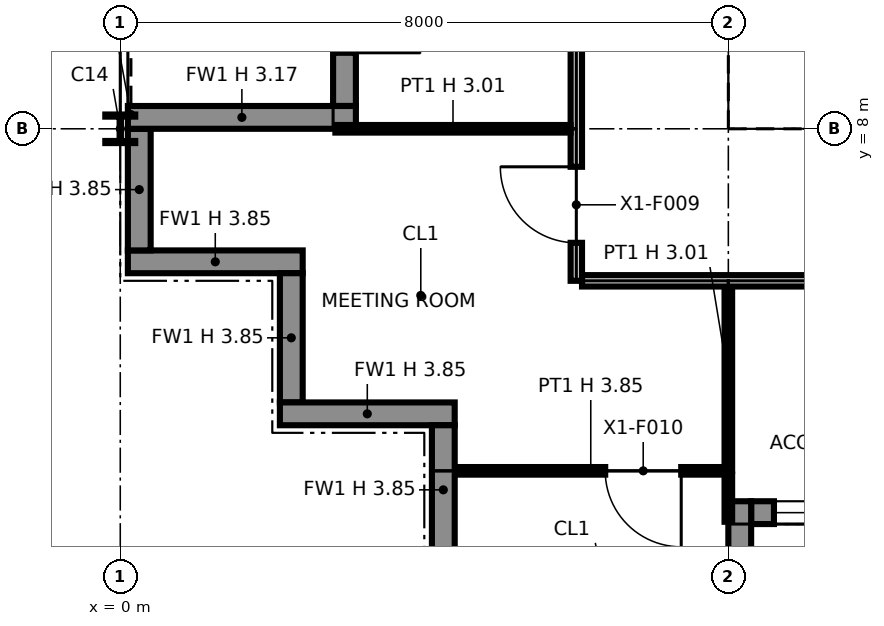
"""IFC4 building model, lengths in metres.
Left out: names, types, materials, properties, quantities, classifications, styles, units other than length and angle.
Written with IfcOpenShell. Run it as: python <this file> out.ifc"""

import sys

from ifc_helpers import new_model, si_unit, direction, frame, frame_2d, origin, origin_2d, place, context, subcontext, project, spatial, polyline, rectangle, i_section, outline, extrude, element, fill, save


model = new_model("IFC4")
c1 = context("Model", 3, precision=1e-05, world=origin(), true_north=direction((0.0, 1.0)))
c2 = subcontext(c1, "Body", "Model", "MODEL_VIEW")
j1 = project(units=[si_unit("LENGTHUNIT", "METRE"), si_unit("PLANEANGLEUNIT", "RADIAN")], contexts=[c1])
p1 = place(None, origin())
s1 = spatial("IfcSite", under=j1, at=p1, CompositionType="ELEMENT")
p2 = place(p1, origin())
s2 = spatial("IfcBuilding", under=s1, at=p2, CompositionType="ELEMENT")
p3 = place(p2, frame((0.0, 0.0, 247.0)))
s3 = spatial("IfcBuildingStorey", under=s2, at=p3, CompositionType="ELEMENT", Elevation=247.0)
p4 = place(p3, frame((0.0, 8.0, 0.0), z_axis=(0.0, 0.0, 1.0), x_axis=(1.0, 0.0, 0.0)))
e1 = element("IfcColumn", 1, at=p4, inside=s3, PredefinedType="COLUMN", context=c2, shape_type="SweptSolid", body=[
    extrude(i_section(OverallWidth=0.394, OverallDepth=0.376, WebThickness=0.017, FlangeThickness=0.028, at=origin_2d()), origin(), (0.0, 0.0, 1.0), 3.85),
])
p5 = place(p3, frame((8.0, 8.0, 0.0), z_axis=(0.0, 0.0, 1.0), x_axis=(1.0, 0.0, 0.0)))
e2 = element("IfcColumn", 2, at=p5, inside=s3, PredefinedType="COLUMN", context=c2, shape_type="SweptSolid", body=[
    extrude(i_section(OverallWidth=0.371, OverallDepth=0.361, WebThickness=0.012, FlangeThickness=0.02, at=origin_2d()), origin(), (0.0, 0.0, 1.0), 3.85),
])
p6 = place(p3, frame((0.1, 6.25, 0.0), z_axis=(0.0, 0.0, 1.0), x_axis=(1.0, 0.0, 0.0)))
e3 = element("IfcWall", 3, at=p6, inside=s3, PredefinedType="SOLIDWALL", context=c2, shape_type="SweptSolid", body=[
    extrude(rectangle(XDim=2.3, YDim=0.3, at=frame_2d((1.15, 0.0))), origin(), (0.0, 0.0, 1.0), 3.85),
])
p7 = place(p3, frame((2.25, 6.1, 0.0), z_axis=(0.0, 0.0, 1.0), x_axis=(0.0, -1.0, 0.0)))
e4 = element("IfcWall", 4, at=p7, inside=s3, PredefinedType="SOLIDWALL", context=c2, shape_type="SweptSolid", body=[
    extrude(rectangle(XDim=1.7, YDim=0.3, at=frame_2d((0.85, 0.0))), origin(), (0.0, 0.0, 1.0), 3.85),
])
p8 = place(p3, frame((2.1, 4.25, 0.0), z_axis=(0.0, 0.0, 1.0), x_axis=(1.0, 0.0, 0.0)))
e5 = element("IfcWall", 5, at=p8, inside=s3, PredefinedType="SOLIDWALL", context=c2, shape_type="SweptSolid", body=[
    extrude(rectangle(XDim=2.3, YDim=0.3, at=frame_2d((1.15, 0.0))), origin(), (0.0, 0.0, 1.0), 3.85),
])
p9 = place(p3, frame((4.25, 4.1, 0.0), z_axis=(0.0, 0.0, 1.0), x_axis=(0.0, -1.0, 0.0)))
e6 = element("IfcWall", 6, at=p9, inside=s3, PredefinedType="SOLIDWALL", context=c2, shape_type="SweptSolid", body=[
    extrude(rectangle(XDim=1.7, YDim=0.3, at=frame_2d((0.85, 0.0))), origin(), (0.0, 0.0, 1.0), 3.85),
])
p10 = place(p3, frame((8.3, 2.95, 0.0), z_axis=(0.0, 0.0, 1.0), x_axis=(1.0, 0.0, 0.0)))
e7 = element("IfcWall", 7, at=p10, inside=s3, PredefinedType="SOLIDWALL", context=c2, shape_type="SweptSolid", body=[
    extrude(rectangle(XDim=7.4, YDim=0.3, at=frame_2d((3.7, 0.0))), origin(), (0.0, 0.0, 1.0), 3.85),
])
p11 = place(p10, frame((0.3, 0.0, 0.9)))
e8 = element("IfcOpeningElement", 8, at=p11, cuts=e7, PredefinedType="OPENING", context=c2, shape_type="SweptSolid", body=[
    extrude(rectangle(XDim=2.8, YDim=2.2, at=frame_2d((1.4, 1.1))), frame((0.0, 0.16, 0.0), z_axis=(0.0, -1.0, 0.0), x_axis=(1.0, 0.0, 0.0)), (0.0, 0.0, 1.0), 0.32),
])
p12 = place(p10, frame((4.7, 0.0, 0.0)))
e9 = element("IfcOpeningElement", 9, at=p12, cuts=e7, PredefinedType="OPENING", context=c2, shape_type="SweptSolid", body=[
    extrude(rectangle(XDim=2.0, YDim=2.4, at=frame_2d((1.0, 1.2))), frame((0.0, 0.16, 0.0), z_axis=(0.0, -1.0, 0.0), x_axis=(1.0, 0.0, 0.0)), (0.0, 0.0, 1.0), 0.32),
])
p13 = place(p3, frame((8.15, 0.1, 0.0), z_axis=(0.0, 0.0, 1.0), x_axis=(0.0, 1.0, 0.0)))
e10 = element("IfcWall", 10, at=p13, inside=s3, PredefinedType="SOLIDWALL", context=c2, shape_type="SweptSolid", body=[
    extrude(rectangle(XDim=3.0, YDim=0.3, at=frame_2d((1.5, 0.0))), origin(), (0.0, 0.0, 1.0), 3.171),
])
p14 = place(p3, frame((2.95, 15.7, 0.0), z_axis=(0.0, 0.0, 1.0), x_axis=(0.0, -1.0, 0.0)))
e11 = element("IfcWall", 11, at=p14, inside=s3, PredefinedType="SOLIDWALL", context=c2, shape_type="SweptSolid", body=[
    extrude(rectangle(XDim=7.4, YDim=0.3, at=frame_2d((3.7, 0.0))), origin(), (0.0, 0.0, 1.0), 3.85),
])
p15 = place(p14, frame((0.3, 0.0, 0.9)))
e12 = element("IfcOpeningElement", 12, at=p15, cuts=e11, PredefinedType="OPENING", context=c2, shape_type="SweptSolid", body=[
    extrude(rectangle(XDim=2.8, YDim=2.2, at=frame_2d((1.4, 1.1))), frame((0.0, 0.16, 0.0), z_axis=(0.0, -1.0, 0.0), x_axis=(1.0, 0.0, 0.0)), (0.0, 0.0, 1.0), 0.32),
])
p16 = place(p14, frame((4.7, 0.0, 0.0)))
e13 = element("IfcOpeningElement", 13, at=p16, cuts=e11, PredefinedType="OPENING", context=c2, shape_type="SweptSolid", body=[
    extrude(rectangle(XDim=2.0, YDim=2.4, at=frame_2d((1.0, 1.2))), frame((0.0, 0.16, 0.0), z_axis=(0.0, -1.0, 0.0), x_axis=(1.0, 0.0, 0.0)), (0.0, 0.0, 1.0), 0.32),
])
p17 = place(p3, frame((0.1, 8.15, 0.0), z_axis=(0.0, 0.0, 1.0), x_axis=(1.0, 0.0, 0.0)))
e14 = element("IfcWall", 14, at=p17, inside=s3, PredefinedType="SOLIDWALL", context=c2, shape_type="SweptSolid", body=[
    extrude(rectangle(XDim=3.0, YDim=0.3, at=frame_2d((1.5, 0.0))), origin(), (0.0, 0.0, 1.0), 3.171),
])
p18 = place(p3, frame((0.25, 8.0, 0.0), z_axis=(0.0, 0.0, 1.0), x_axis=(0.0, -1.0, 0.0)))
e15 = element("IfcWall", 15, at=p18, inside=s3, PredefinedType="SOLIDWALL", context=c2, shape_type="SweptSolid", body=[
    extrude(rectangle(XDim=1.6, YDim=0.3, at=frame_2d((0.8, 0.0))), origin(), (0.0, 0.0, 1.0), 3.85),
])
p19 = place(p3, frame((8.65, 8.75, 0.0), z_axis=(0.0, 0.0, 1.0), x_axis=(1.0, 0.0, 0.0)))
e16 = element("IfcWall", 16, at=p19, inside=s3, PredefinedType="PARTITIONING", context=c2, shape_type="SweptSolid", body=[
    extrude(outline(polyline([(0.0, 0.0), (14.7, 0.0), (14.7, 3.85), (7.438, 3.85), (7.438, 3.308), (7.262, 3.308), (7.261, 3.85), (0.0, 3.85), (0.0, 0.0)])), frame((0.0, 0.1, 0.0), z_axis=(0.0, -1.0, 0.0), x_axis=(1.0, 0.0, 0.0)), (0.0, 0.0, 1.0), 0.2),
])
p20 = place(p19, frame((1.3, 0.0, 0.0)))
e17 = element("IfcOpeningElement", 17, at=p20, cuts=e16, PredefinedType="OPENING", context=c2, shape_type="SweptSolid", body=[
    extrude(rectangle(XDim=1.4, YDim=2.1, at=frame_2d((0.7, 1.05))), frame((0.0, 0.11, 0.0), z_axis=(0.0, -1.0, 0.0), x_axis=(1.0, 0.0, 0.0)), (0.0, 0.0, 1.0), 0.22),
])
p21 = place(p19, frame((4.6, 0.0, 0.0)))
e18 = element("IfcOpeningElement", 18, at=p21, cuts=e16, PredefinedType="OPENING", context=c2, shape_type="SweptSolid", body=[
    extrude(rectangle(XDim=1.4, YDim=2.1, at=frame_2d((0.7, 1.05))), frame((0.0, 0.11, 0.0), z_axis=(0.0, -1.0, 0.0), x_axis=(1.0, 0.0, 0.0)), (0.0, 0.0, 1.0), 0.22),
])
p22 = place(p19, frame((10.4, 0.0, 0.0)))
e19 = element("IfcOpeningElement", 19, at=p22, cuts=e16, PredefinedType="OPENING", context=c2, shape_type="SweptSolid", body=[
    extrude(rectangle(XDim=1.2, YDim=2.1, at=frame_2d((0.6, 1.05))), frame((0.0, 0.11, 0.0), z_axis=(0.0, -1.0, 0.0), x_axis=(1.0, 0.0, 0.0)), (0.0, 0.0, 1.0), 0.22),
])
p23 = place(p3, frame((8.75, 8.85, 0.0), z_axis=(0.0, 0.0, 1.0), x_axis=(0.0, 1.0, 0.0)))
e20 = element("IfcWall", 20, at=p23, inside=s3, PredefinedType="PARTITIONING", context=c2, shape_type="SweptSolid", body=[
    extrude(outline(polyline([(0.0, 0.0), (14.3, 0.0), (14.3, 3.85), (10.225, 3.85), (10.224, 3.44), (10.076, 3.44), (10.075, 3.85), (7.239, 3.85), (7.238, 3.308), (7.062, 3.308), (7.062, 3.85), (0.0, 3.85), (0.0, 0.0)])), frame((0.0, 0.1, 0.0), z_axis=(0.0, -1.0, 0.0), x_axis=(1.0, 0.0, 0.0)), (0.0, 0.0, 1.0), 0.2),
])
p24 = place(p23, frame((8.3, 0.0, 0.0)))
e21 = element("IfcOpeningElement", 21, at=p24, cuts=e20, PredefinedType="OPENING", context=c2, shape_type="SweptSolid", body=[
    extrude(rectangle(XDim=1.8, YDim=2.1, at=frame_2d((0.9, 1.05))), frame((0.0, 0.11, 0.0), z_axis=(0.0, -1.0, 0.0), x_axis=(1.0, 0.0, 0.0)), (0.0, 0.0, 1.0), 0.22),
])
p25 = place(p3, frame((8.0, 2.83, 0.0), z_axis=(0.0, 0.0, 1.0), x_axis=(0.0, 1.0, 0.0)))
e22 = element("IfcWall", 22, at=p25, inside=s3, PredefinedType="PARTITIONING", context=c2, shape_type="SweptSolid", body=[
    extrude(rectangle(XDim=0.62, YDim=0.1, at=frame_2d((0.31, 0.0))), origin(), (0.0, 0.0, 1.0), 3.014),
])
p26 = place(p3, frame((4.43, 3.5, 0.0), z_axis=(0.0, 0.0, 1.0), x_axis=(1.0, 0.0, 0.0)))
e23 = element("IfcWall", 23, at=p26, inside=s3, PredefinedType="PARTITIONING", context=c2, shape_type="SweptSolid", body=[
    extrude(rectangle(XDim=3.52, YDim=0.1, at=frame_2d((1.76, 0.0))), origin(), (0.0, 0.0, 1.0), 3.85),
])
p27 = place(p26, frame((2.95, 0.0, 0.0), z_axis=(0.0, 0.0, 1.0), x_axis=(-1.0, 0.0, 0.0)))
e24 = element("IfcOpeningElement", 24, at=p27, cuts=e23, PredefinedType="OPENING", context=c2, shape_type="SweptSolid", body=[
    extrude(rectangle(XDim=1.0, YDim=2.1, at=frame_2d((0.5, 1.05))), frame((0.0, 0.06, 0.0), z_axis=(0.0, -1.0, 0.0), x_axis=(1.0, 0.0, 0.0)), (0.0, 0.0, 1.0), 0.12),
])
p28 = place(p3, frame((8.0, 3.5, 0.0), z_axis=(0.0, 0.0, 1.0), x_axis=(0.0, 1.0, 0.0)))
e25 = element("IfcWall", 25, at=p28, inside=s3, PredefinedType="PARTITIONING", context=c2, shape_type="SweptSolid", body=[
    extrude(rectangle(XDim=2.425, YDim=0.1, at=frame_2d((1.212, 0.0))), origin(), (0.0, 0.0, 1.0), 3.014),
])
p29 = place(p3, frame((6.075, 6.0, 0.0), z_axis=(0.0, 0.0, 1.0), x_axis=(1.0, 0.0, 0.0)))
e26 = element("IfcWall", 26, at=p29, inside=s3, PredefinedType="PARTITIONING", context=c2, shape_type="SweptSolid", body=[
    extrude(rectangle(XDim=35.85, YDim=0.15, at=frame_2d((17.925, 0.0))), origin(), (0.0, 0.0, 1.0), 3.85),
])
p30 = place(p29, frame((14.425, 0.0, 0.0), z_axis=(0.0, 0.0, 1.0), x_axis=(-1.0, 0.0, 0.0)))
e27 = element("IfcOpeningElement", 27, at=p30, cuts=e26, PredefinedType="OPENING", context=c2, shape_type="SweptSolid", body=[
    extrude(rectangle(XDim=1.0, YDim=2.1, at=frame_2d((0.5, 1.05))), frame((0.0, 0.085, 0.0), z_axis=(0.0, -1.0, 0.0), x_axis=(1.0, 0.0, 0.0)), (0.0, 0.0, 1.0), 0.17),
])
p31 = place(p29, frame((30.425, 0.0, 0.0), z_axis=(0.0, 0.0, 1.0), x_axis=(-1.0, 0.0, 0.0)))
e28 = element("IfcOpeningElement", 28, at=p31, cuts=e26, PredefinedType="OPENING", context=c2, shape_type="SweptSolid", body=[
    extrude(rectangle(XDim=1.0, YDim=2.1, at=frame_2d((0.5, 1.05))), frame((0.0, 0.085, 0.0), z_axis=(0.0, -1.0, 0.0), x_axis=(1.0, 0.0, 0.0)), (0.0, 0.0, 1.0), 0.17),
])
p32 = place(p29, frame((4.425, 0.0, 0.0), z_axis=(0.0, 0.0, 1.0), x_axis=(-1.0, 0.0, 0.0)))
e29 = element("IfcOpeningElement", 29, at=p32, cuts=e26, PredefinedType="OPENING", context=c2, shape_type="SweptSolid", body=[
    extrude(rectangle(XDim=1.0, YDim=2.1, at=frame_2d((0.5, 1.05))), frame((0.0, 0.085, 0.0), z_axis=(0.0, -1.0, 0.0), x_axis=(1.0, 0.0, 0.0)), (0.0, 0.0, 1.0), 0.17),
])
p33 = place(p29, frame((8.425, 0.0, 0.0), z_axis=(0.0, 0.0, 1.0), x_axis=(-1.0, 0.0, 0.0)))
e30 = element("IfcOpeningElement", 30, at=p33, cuts=e26, PredefinedType="OPENING", context=c2, shape_type="SweptSolid", body=[
    extrude(rectangle(XDim=1.0, YDim=2.1, at=frame_2d((0.5, 1.05))), frame((0.0, 0.085, 0.0), z_axis=(0.0, -1.0, 0.0), x_axis=(1.0, 0.0, 0.0)), (0.0, 0.0, 1.0), 0.17),
])
p34 = place(p29, frame((19.425, 0.0, 0.0), z_axis=(0.0, 0.0, 1.0), x_axis=(-1.0, 0.0, 0.0)))
e31 = element("IfcOpeningElement", 31, at=p34, cuts=e26, PredefinedType="OPENING", context=c2, shape_type="SweptSolid", body=[
    extrude(rectangle(XDim=1.0, YDim=2.1, at=frame_2d((0.5, 1.05))), frame((0.0, 0.085, 0.0), z_axis=(0.0, -1.0, 0.0), x_axis=(1.0, 0.0, 0.0)), (0.0, 0.0, 1.0), 0.17),
])
p35 = place(p29, frame((24.425, 0.0, 0.0), z_axis=(0.0, 0.0, 1.0), x_axis=(-1.0, 0.0, 0.0)))
e32 = element("IfcOpeningElement", 32, at=p35, cuts=e26, PredefinedType="OPENING", context=c2, shape_type="SweptSolid", body=[
    extrude(rectangle(XDim=1.0, YDim=2.1, at=frame_2d((0.5, 1.05))), frame((0.0, 0.085, 0.0), z_axis=(0.0, -1.0, 0.0), x_axis=(1.0, 0.0, 0.0)), (0.0, 0.0, 1.0), 0.17),
])
p36 = place(p29, frame((35.425, 0.0, 0.0), z_axis=(0.0, 0.0, 1.0), x_axis=(-1.0, 0.0, 0.0)))
e33 = element("IfcOpeningElement", 33, at=p36, cuts=e26, PredefinedType="OPENING", context=c2, shape_type="SweptSolid", body=[
    extrude(rectangle(XDim=1.0, YDim=2.1, at=frame_2d((0.5, 1.05))), frame((0.0, 0.085, 0.0), z_axis=(0.0, -1.0, 0.0), x_axis=(1.0, 0.0, 0.0)), (0.0, 0.0, 1.0), 0.17),
])
p37 = place(p3, frame((6.0, 6.0, 0.0), z_axis=(0.0, 0.0, 1.0), x_axis=(0.0, 1.0, 0.0)))
e34 = element("IfcWall", 34, at=p37, inside=s3, PredefinedType="PARTITIONING", context=c2, shape_type="SweptSolid", body=[
    extrude(outline(polyline([(0.0, 0.0), (13.375, 0.0), (13.375, 3.85), (10.3, 3.85), (10.298, 3.014), (9.702, 3.014), (9.7, 3.85), (6.3, 3.85), (6.298, 3.014), (5.702, 3.014), (5.7, 3.85), (2.3, 3.85), (2.298, 3.014), (1.702, 3.014), (1.7, 3.85), (0.0, 3.85), (0.0, 0.0)])), frame((0.0, 0.075, 0.0), z_axis=(0.0, -1.0, 0.0), x_axis=(1.0, 0.0, 0.0)), (0.0, 0.0, 1.0), 0.15),
])
p38 = place(p37, frame((0.5, 0.0, 0.0)))
e35 = element("IfcOpeningElement", 35, at=p38, cuts=e34, PredefinedType="OPENING", context=c2, shape_type="SweptSolid", body=[
    extrude(rectangle(XDim=1.0, YDim=2.1, at=frame_2d((0.5, 1.05))), frame((0.0, 0.085, 0.0), z_axis=(0.0, -1.0, 0.0), x_axis=(1.0, 0.0, 0.0)), (0.0, 0.0, 1.0), 0.17),
])
p39 = place(p37, frame((3.5, 0.0, 0.0)))
e36 = element("IfcOpeningElement", 36, at=p39, cuts=e34, PredefinedType="OPENING", context=c2, shape_type="SweptSolid", body=[
    extrude(rectangle(XDim=1.0, YDim=2.1, at=frame_2d((0.5, 1.05))), frame((0.0, 0.085, 0.0), z_axis=(0.0, -1.0, 0.0), x_axis=(1.0, 0.0, 0.0)), (0.0, 0.0, 1.0), 0.17),
])
p40 = place(p37, frame((7.5, 0.0, 0.0)))
e37 = element("IfcOpeningElement", 37, at=p40, cuts=e34, PredefinedType="OPENING", context=c2, shape_type="SweptSolid", body=[
    extrude(rectangle(XDim=1.0, YDim=2.1, at=frame_2d((0.5, 1.05))), frame((0.0, 0.085, 0.0), z_axis=(0.0, -1.0, 0.0), x_axis=(1.0, 0.0, 0.0)), (0.0, 0.0, 1.0), 0.17),
])
p41 = place(p37, frame((11.225, 0.0, 0.0)))
e38 = element("IfcOpeningElement", 38, at=p41, cuts=e34, PredefinedType="OPENING", context=c2, shape_type="SweptSolid", body=[
    extrude(rectangle(XDim=1.0, YDim=2.1, at=frame_2d((0.5, 1.05))), frame((0.0, 0.085, 0.0), z_axis=(0.0, -1.0, 0.0), x_axis=(1.0, 0.0, 0.0)), (0.0, 0.0, 1.0), 0.17),
])
p42 = place(p3, frame((2.83, 8.0, 0.0), z_axis=(0.0, 0.0, 1.0), x_axis=(1.0, 0.0, 0.0)))
e39 = element("IfcWall", 39, at=p42, inside=s3, PredefinedType="PARTITIONING", context=c2, shape_type="SweptSolid", body=[
    extrude(rectangle(XDim=3.095, YDim=0.1, at=frame_2d((1.547, 0.0))), origin(), (0.0, 0.0, 1.0), 3.014),
])
p43 = place(p11, origin())
e40 = element("IfcWindow", 40, at=p43, inside=s3, PartitioningType="SINGLE_PANEL", PredefinedType="WINDOW", context=c2, shape_type="SweptSolid", body=[
    extrude(rectangle(XDim=2.8, YDim=2.2, at=frame_2d((1.4, 1.1))), frame((0.0, 0.03, 0.0), z_axis=(0.0, -1.0, 0.0), x_axis=(1.0, 0.0, 0.0)), (0.0, 0.0, 1.0), 0.06),
])
fill(e8, e40)
p44 = place(p38, origin())
e41 = element("IfcDoor", 41, at=p44, inside=s3, OperationType="SINGLE_SWING_RIGHT", PredefinedType="DOOR", context=c2, shape_type="SweptSolid", body=[
    extrude(rectangle(XDim=1.0, YDim=2.1, at=frame_2d((0.5, 1.05))), frame((0.0, 0.025, 0.0), z_axis=(0.0, -1.0, 0.0), x_axis=(1.0, 0.0, 0.0)), (0.0, 0.0, 1.0), 0.05),
])
fill(e35, e41)
p45 = place(p27, origin())
e42 = element("IfcDoor", 42, at=p45, inside=s3, OperationType="SINGLE_SWING_LEFT", PredefinedType="DOOR", context=c2, shape_type="SweptSolid", body=[
    extrude(rectangle(XDim=1.0, YDim=2.1, at=frame_2d((0.5, 1.05))), frame((0.0, 0.025, 0.0), z_axis=(0.0, -1.0, 0.0), x_axis=(1.0, 0.0, 0.0)), (0.0, 0.0, 1.0), 0.05),
])
fill(e24, e42)
save(model, sys.argv[1])
